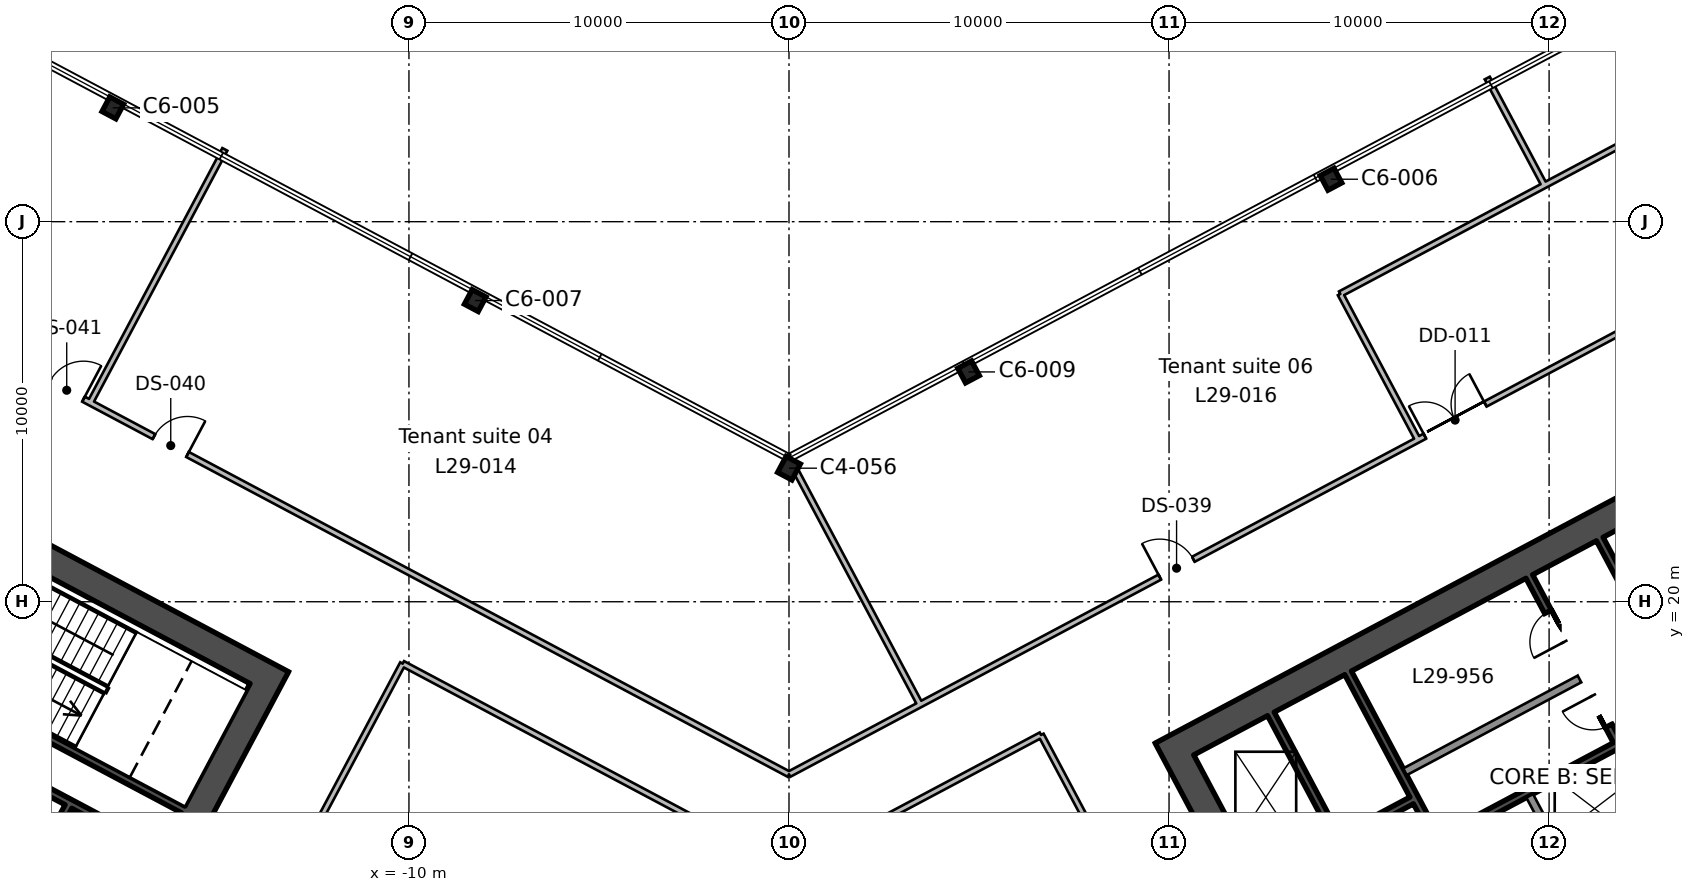
"""IFC4 building model, lengths in metres.
Left out: names, types, materials, properties, quantities, classifications, styles, units other than length and angle.
Written with IfcOpenShell. Run it as: python <this file> out.ifc"""

import sys

from ifc_helpers import new_model, si_unit, direction, frame, frame_2d, origin, origin_2d, place, context, subcontext, project, spatial, rectangle, i_section, extrude, element, fill, save


model = new_model("IFC4")
c1 = context("Model", 3, precision=1e-05, world=origin(), true_north=direction((0.0, 1.0)))
c2 = subcontext(c1, "Body", "Model", "MODEL_VIEW")
j1 = project(units=[si_unit("LENGTHUNIT", "METRE"), si_unit("PLANEANGLEUNIT", "RADIAN")], contexts=[c1])
p1 = place(None, origin())
s1 = spatial("IfcSite", under=j1, at=p1, CompositionType="ELEMENT")
p2 = place(p1, origin())
s2 = spatial("IfcBuilding", under=s1, at=p2, CompositionType="ELEMENT")
p3 = place(p2, frame((0.0, 0.0, 142.2)))
s3 = spatial("IfcBuildingStorey", under=s2, at=p3, CompositionType="ELEMENT", Elevation=142.2)
p4 = place(p3, frame((0.0, 23.514, 0.0), z_axis=(0.0, 0.0, 1.0), x_axis=(-0.882947592859, 0.469471562786, 0.0)))
e1 = element("IfcColumn", 1, at=p4, inside=s3, PredefinedType="COLUMN", context=c2, shape_type="SweptSolid", body=[
    extrude(i_section(OverallWidth=0.424, OverallDepth=0.475, WebThickness=0.048, FlangeThickness=0.077, FilletRadius=0.015, at=origin_2d()), origin(), (0.0, 0.0, 1.0), 4.0),
])
for number, where, z_axis, x_axis in (
    (2, (4.725, 26.047, 0.0), (0.0, 0.0, 1.0), (-0.883, -0.469, 0.0)),
    (3, (-8.257, 27.925, 0.0), (0.0, 0.0, 1.0), (-0.883, 0.469, 0.0)),
    (4, (14.261, 31.117, 0.0), (0.0, 0.0, 1.0), (-0.883, -0.469, 0.0)),
    (5, (-17.792, 32.995, 0.0), (0.0, 0.0, 1.0), (-0.883, 0.469, 0.0)),
):
    element("IfcColumn", number, at=place(p3, frame(where, z_axis=z_axis, x_axis=x_axis)), inside=s3, PredefinedType="COLUMN", context=c2, shape_type="SweptSolid", body=[
        extrude(i_section(OverallWidth=0.412, OverallDepth=0.434, WebThickness=0.036, FlangeThickness=0.057, FilletRadius=0.015, at=origin_2d()), origin(), (0.0, 0.0, 1.0), 4.0),
    ])
p5 = place(p3, frame((-13.498, 18.333, 0.0), z_axis=(0.0, 0.0, 1.0), x_axis=(-0.469469918705, -0.88294846703, 0.0)))
e6 = element("IfcWall", 6, at=p5, inside=s3, PredefinedType="SHEAR", context=c2, shape_type="SweptSolid", body=[
    extrude(rectangle(XDim=19.7, YDim=0.75, at=frame_2d((9.85, 0.0))), origin(), (0.0, 0.0, 1.0), 4.0),
])
p6 = place(p5, frame((6.85, 0.0, 0.0)))
e7 = element("IfcOpeningElement", 7, at=p6, cuts=e6, PredefinedType="OPENING", context=c2, shape_type="SweptSolid", body=[
    extrude(rectangle(XDim=2.4, YDim=2.4, at=frame_2d((1.2, 1.2))), frame((0.0, 0.385, 0.0), z_axis=(0.0, -1.0, 0.0), x_axis=(1.0, 0.0, 0.0)), (0.0, 0.0, 1.0), 0.77),
])
p7 = place(p3, frame((-14.005, 18.178, 0.0), z_axis=(0.0, 0.0, 1.0), x_axis=(-0.88295010195, 0.469466843842, 0.0)))
e8 = element("IfcWall", 8, at=p7, inside=s3, PredefinedType="SHEAR", context=c2, shape_type="SweptSolid", body=[
    extrude(rectangle(XDim=20.2, YDim=0.75, at=frame_2d((10.1, 0.0))), origin(), (0.0, 0.0, 1.0), 4.0),
])
p8 = place(p3, frame((-18.96, 14.611, 0.0), z_axis=(0.0, 0.0, 1.0), x_axis=(-0.4694473164, -0.882960484464, 0.0)))
e9 = element("IfcWall", 9, at=p8, inside=s3, PredefinedType="SHEAR", context=c2, shape_type="SweptSolid", body=[
    extrude(rectangle(XDim=2.2, YDim=0.2, at=frame_2d((1.1, 0.0))), origin(), (0.0, 0.0, 1.0), 4.0),
])
p9 = place(p3, frame((-15.942, 14.536, 0.0), z_axis=(0.0, 0.0, 1.0), x_axis=(-0.882946947542, 0.469472776449, 0.0)))
e10 = element("IfcWall", 10, at=p9, inside=s3, PredefinedType="SHEAR", context=c2, shape_type="SweptSolid", body=[
    extrude(rectangle(XDim=8.0, YDim=0.2, at=frame_2d((4.0, 0.0))), origin(), (0.0, 0.0, 1.0), 4.0),
])
p10 = place(p3, frame((-16.529, 13.432, 0.0), z_axis=(0.0, 0.0, 1.0), x_axis=(-0.88295287151, 0.469461634952, 0.0)))
e11 = element("IfcWall", 11, at=p10, inside=s3, PredefinedType="SHEAR", context=c2, shape_type="SweptSolid", body=[
    extrude(rectangle(XDim=8.0, YDim=0.2, at=frame_2d((4.0, 0.0))), origin(), (0.0, 0.0, 1.0), 4.0),
])
p11 = place(p3, frame((19.215, -0.939, 0.0), z_axis=(0.0, 0.0, 1.0), x_axis=(-0.469479580143, 0.882943329908, 0.0)))
e12 = element("IfcWall", 12, at=p11, inside=s3, PredefinedType="SHEAR", context=c2, shape_type="SweptSolid", body=[
    extrude(rectangle(XDim=19.7, YDim=0.75, at=frame_2d((9.85, 0.0))), origin(), (0.0, 0.0, 1.0), 4.0),
])
p12 = place(p11, frame((6.85, 0.0, 0.0)))
e13 = element("IfcOpeningElement", 13, at=p12, cuts=e12, PredefinedType="OPENING", context=c2, shape_type="SweptSolid", body=[
    extrude(rectangle(XDim=2.4, YDim=2.4, at=frame_2d((1.2, 1.2))), frame((0.0, 0.385, 0.0), z_axis=(0.0, -1.0, 0.0), x_axis=(1.0, 0.0, 0.0)), (0.0, 0.0, 1.0), 0.77),
])
p13 = place(p3, frame((10.474, 16.3, 0.0), z_axis=(0.0, 0.0, 1.0), x_axis=(0.88295010195, 0.469466843842, 0.0)))
e14 = element("IfcWall", 14, at=p13, inside=s3, PredefinedType="SHEAR", context=c2, shape_type="SweptSolid", body=[
    extrude(rectangle(XDim=20.2, YDim=0.75, at=frame_2d((10.1, 0.0))), origin(), (0.0, 0.0, 1.0), 4.0),
])
p14 = place(p3, frame((14.394, 13.826, 0.0), z_axis=(0.0, 0.0, 1.0), x_axis=(-0.469494272526, 0.882935517501, 0.0)))
e15 = element("IfcWall", 15, at=p14, inside=s3, PredefinedType="SHEAR", context=c2, shape_type="SweptSolid", body=[
    extrude(rectangle(XDim=3.65, YDim=0.2, at=frame_2d((1.825, 0.0))), origin(), (0.0, 0.0, 1.0), 4.0),
])
p15 = place(p3, frame((18.138, 11.683, 0.0), z_axis=(0.0, 0.0, 1.0), x_axis=(-0.469480409012, 0.88294288918, 0.0)))
e16 = element("IfcWall", 16, at=p15, inside=s3, PredefinedType="SHEAR", context=c2, shape_type="SweptSolid", body=[
    extrude(rectangle(XDim=7.3, YDim=0.2, at=frame_2d((3.65, 0.0))), origin(), (0.0, 0.0, 1.0), 4.0),
])
p16 = place(p3, frame((20.522, 12.95, 0.0), z_axis=(0.0, 0.0, 1.0), x_axis=(-0.469401318492, 0.882984938828, 0.0)))
e17 = element("IfcWall", 17, at=p16, inside=s3, PredefinedType="SOLIDWALL", context=c2, shape_type="SweptSolid", body=[
    extrude(rectangle(XDim=2.2, YDim=0.2, at=frame_2d((1.1, 0.0))), origin(), (0.0, 0.0, 1.0), 4.0),
])
p17 = place(p3, frame((22.906, 14.218, 0.0), z_axis=(0.0, 0.0, 1.0), x_axis=(-0.469480409012, 0.88294288918, 0.0)))
e18 = element("IfcWall", 18, at=p17, inside=s3, PredefinedType="SHEAR", context=c2, shape_type="SweptSolid", body=[
    extrude(rectangle(XDim=7.3, YDim=0.2, at=frame_2d((3.65, 0.0))), origin(), (0.0, 0.0, 1.0), 4.0),
])
p18 = place(p17, frame((2.85, 0.0, 0.0)))
e19 = element("IfcOpeningElement", 19, at=p18, cuts=e18, PredefinedType="OPENING", context=c2, shape_type="SweptSolid", body=[
    extrude(rectangle(XDim=0.9, YDim=2.1, at=frame_2d((0.45, 1.05))), frame((0.0, 0.11, 0.0), z_axis=(0.0, -1.0, 0.0), x_axis=(1.0, 0.0, 0.0)), (0.0, 0.0, 1.0), 0.22),
])
p19 = place(p17, frame((5.35, 0.0, 0.0)))
e20 = element("IfcOpeningElement", 20, at=p19, cuts=e18, PredefinedType="OPENING", context=c2, shape_type="SweptSolid", body=[
    extrude(rectangle(XDim=0.9, YDim=2.1, at=frame_2d((0.45, 1.05))), frame((0.0, 0.11, 0.0), z_axis=(0.0, -1.0, 0.0), x_axis=(1.0, 0.0, 0.0)), (0.0, 0.0, 1.0), 0.22),
])
p20 = place(p3, frame((24.76, 15.204, 0.0), z_axis=(0.0, 0.0, 1.0), x_axis=(-0.469494272526, 0.882935517501, 0.0)))
e21 = element("IfcWall", 21, at=p20, inside=s3, PredefinedType="SHEAR", context=c2, shape_type="SweptSolid", body=[
    extrude(rectangle(XDim=7.3, YDim=0.2, at=frame_2d((3.65, 0.0))), origin(), (0.0, 0.0, 1.0), 4.0),
])
p21 = place(p20, frame((4.8, 0.0, 0.0)))
e22 = element("IfcOpeningElement", 22, at=p21, cuts=e21, PredefinedType="OPENING", context=c2, shape_type="SweptSolid", body=[
    extrude(rectangle(XDim=1.2, YDim=2.1, at=frame_2d((0.6, 1.05))), frame((0.0, 0.11, 0.0), z_axis=(0.0, -1.0, 0.0), x_axis=(1.0, 0.0, 0.0)), (0.0, 0.0, 1.0), 0.22),
])
p22 = place(p3, frame((17.147, 13.761, 0.0), z_axis=(0.0, 0.0, 1.0), x_axis=(0.882964314875, 0.469440111896, 0.0)))
e23 = element("IfcWall", 23, at=p22, inside=s3, PredefinedType="SHEAR", context=c2, shape_type="SweptSolid", body=[
    extrude(rectangle(XDim=5.2, YDim=0.2, at=frame_2d((2.6, 0.0))), origin(), (0.0, 0.0, 1.0), 4.0),
])
p23 = place(p3, frame((12.41, 12.658, 0.0), z_axis=(0.0, 0.0, 1.0), x_axis=(0.8829484765, 0.469469900894, 0.0)))
e24 = element("IfcWall", 24, at=p23, inside=s3, PredefinedType="SHEAR", context=c2, shape_type="SweptSolid", body=[
    extrude(rectangle(XDim=4.5, YDim=0.2, at=frame_2d((2.25, 0.0))), origin(), (0.0, 0.0, 1.0), 4.0),
])
p24 = place(p23, frame((0.6, 0.0, 0.0)))
e25 = element("IfcOpeningElement", 25, at=p24, cuts=e24, PredefinedType="OPENING", context=c2, shape_type="SweptSolid", body=[
    extrude(rectangle(XDim=1.1, YDim=2.1, at=frame_2d((0.55, 1.05))), frame((0.0, 0.11, 0.0), z_axis=(0.0, -1.0, 0.0), x_axis=(1.0, 0.0, 0.0)), (0.0, 0.0, 1.0), 0.22),
])
p25 = place(p3, frame((16.208, 15.527, 0.0), z_axis=(0.0, 0.0, 1.0), x_axis=(0.882953967957, 0.469459572775, 0.0)))
e26 = element("IfcWall", 26, at=p25, inside=s3, PredefinedType="SOLIDWALL", context=c2, shape_type="SweptSolid", body=[
    extrude(rectangle(XDim=5.2, YDim=0.2, at=frame_2d((2.6, 0.0))), origin(), (0.0, 0.0, 1.0), 4.0),
])
p26 = place(p3, frame((-32.47, 32.724, 0.0), z_axis=(0.0, 0.0, 1.0), x_axis=(0.88295243426, -0.469462457321, 0.0)))
e27 = element("IfcWall", 27, at=p26, inside=s3, PredefinedType="PARTITIONING", context=c2, shape_type="SweptSolid", body=[
    extrude(rectangle(XDim=36.774, YDim=0.15, at=frame_2d((18.387, 0.0))), origin(), (0.0, 0.0, 1.0), 3.64),
])
p27 = place(p26, frame((17.85, 0.0, 0.0)))
e28 = element("IfcOpeningElement", 28, at=p27, cuts=e27, PredefinedType="OPENING", context=c2, shape_type="SweptSolid", body=[
    extrude(rectangle(XDim=1.0, YDim=2.1, at=frame_2d((0.5, 1.05))), frame((0.0, 0.085, 0.0), z_axis=(0.0, -1.0, 0.0), x_axis=(1.0, 0.0, 0.0)), (0.0, 0.0, 1.0), 0.17),
])
p28 = place(p26, frame((14.75, 0.0, 0.0)))
e29 = element("IfcOpeningElement", 29, at=p28, cuts=e27, PredefinedType="OPENING", context=c2, shape_type="SweptSolid", body=[
    extrude(rectangle(XDim=1.0, YDim=2.1, at=frame_2d((0.5, 1.05))), frame((0.0, 0.085, 0.0), z_axis=(0.0, -1.0, 0.0), x_axis=(1.0, 0.0, 0.0)), (0.0, 0.0, 1.0), 0.17),
])
p29 = place(p3, frame((0.0, 15.46, 0.0), z_axis=(0.0, 0.0, 1.0), x_axis=(0.882944798935, 0.469476817355, 0.0)))
e30 = element("IfcWall", 30, at=p29, inside=s3, PredefinedType="PARTITIONING", context=c2, shape_type="SweptSolid", body=[
    extrude(rectangle(XDim=23.107, YDim=0.15, at=frame_2d((11.553, 0.0))), origin(), (0.0, 0.0, 1.0), 3.64),
])
p30 = place(p29, frame((18.95, 0.0, 0.0)))
e31 = element("IfcOpeningElement", 31, at=p30, cuts=e30, PredefinedType="OPENING", context=c2, shape_type="SweptSolid", body=[
    extrude(rectangle(XDim=1.8, YDim=2.1, at=frame_2d((0.9, 1.05))), frame((0.0, 0.085, 0.0), z_axis=(0.0, -1.0, 0.0), x_axis=(1.0, 0.0, 0.0)), (0.0, 0.0, 1.0), 0.17),
])
p31 = place(p29, frame((11.05, 0.0, 0.0)))
e32 = element("IfcOpeningElement", 32, at=p31, cuts=e30, PredefinedType="OPENING", context=c2, shape_type="SweptSolid", body=[
    extrude(rectangle(XDim=1.0, YDim=2.1, at=frame_2d((0.5, 1.05))), frame((0.0, 0.085, 0.0), z_axis=(0.0, -1.0, 0.0), x_axis=(1.0, 0.0, 0.0)), (0.0, 0.0, 1.0), 0.17),
])
p32 = place(p3, frame((-14.844, 31.903, 0.0), z_axis=(0.0, 0.0, 1.0), x_axis=(-0.469271860983, -0.883053747226, 0.0)))
e33 = element("IfcWall", 33, at=p32, inside=s3, PredefinedType="PARTITIONING", context=c2, shape_type="SweptSolid", body=[
    extrude(rectangle(XDim=7.55, YDim=0.15, at=frame_2d((3.775, 0.0))), origin(), (0.0, 0.0, 1.0), 3.64),
])
p33 = place(p3, frame((0.191, 23.422, 0.0), z_axis=(0.0, 0.0, 1.0), x_axis=(0.46954180368, -0.882910241529, 0.0)))
e34 = element("IfcWall", 34, at=p33, inside=s3, PredefinedType="PARTITIONING", context=c2, shape_type="SweptSolid", body=[
    extrude(rectangle(XDim=6.941, YDim=0.15, at=frame_2d((3.47, 0.0))), origin(), (0.0, 0.0, 1.0), 3.64),
])
p34 = place(p3, frame((14.507, 28.1, 0.0), z_axis=(0.0, 0.0, 1.0), x_axis=(0.469255579647, -0.883062399251, 0.0)))
e35 = element("IfcWall", 35, at=p34, inside=s3, PredefinedType="PARTITIONING", context=c2, shape_type="SweptSolid", body=[
    extrude(rectangle(XDim=4.328, YDim=0.15, at=frame_2d((2.164, 0.0))), origin(), (0.0, 0.0, 1.0), 3.64),
])
p35 = place(p3, frame((14.506, 28.099, 0.0), z_axis=(0.0, 0.0, 1.0), x_axis=(0.882949189538, 0.469468559857, 0.0)))
e36 = element("IfcWall", 36, at=p35, inside=s3, PredefinedType="PARTITIONING", context=c2, shape_type="SweptSolid", body=[
    extrude(rectangle(XDim=6.0, YDim=0.15, at=frame_2d((3.0, 0.0))), origin(), (0.0, 0.0, 1.0), 3.64),
])
p36 = place(p3, frame((18.374, 33.78, 0.0), z_axis=(0.0, 0.0, 1.0), x_axis=(0.469685095616, -0.882834022315, 0.0)))
e37 = element("IfcWall", 37, at=p36, inside=s3, PredefinedType="PARTITIONING", context=c2, shape_type="SweptSolid", body=[
    extrude(rectangle(XDim=3.2, YDim=0.15, at=frame_2d((1.6, 0.0))), origin(), (0.0, 0.0, 1.0), 3.64),
])
p37 = place(p3, frame((19.804, 30.916, 0.0), z_axis=(0.0, 0.0, 1.0), x_axis=(0.882942088651, 0.469481914548, 0.0)))
e38 = element("IfcWall", 38, at=p37, inside=s3, PredefinedType="PARTITIONING", context=c2, shape_type="SweptSolid", body=[
    extrude(rectangle(XDim=23.511, YDim=0.15, at=frame_2d((11.756, 0.0))), origin(), (0.0, 0.0, 1.0), 3.64),
])
p38 = place(p3, frame((20.402, 26.308, 0.0), z_axis=(0.0, 0.0, 1.0), x_axis=(0.882958355843, 0.469451319997, 0.0)))
e39 = element("IfcWall", 39, at=p38, inside=s3, PredefinedType="PARTITIONING", context=c2, shape_type="SweptSolid", body=[
    extrude(rectangle(XDim=18.285, YDim=0.15, at=frame_2d((9.143, 0.0))), origin(), (0.0, 0.0, 1.0), 3.64),
])
p39 = place(p3, frame((-20.915, -1.847, 0.0), z_axis=(0.0, 0.0, 1.0), x_axis=(0.469483365134, 0.882941317338, 0.0)))
e40 = element("IfcWall", 40, at=p39, inside=s3, PredefinedType="PARTITIONING", context=c2, shape_type="SweptSolid", body=[
    extrude(rectangle(XDim=22.9, YDim=0.15, at=frame_2d((11.45, 0.0))), origin(), (0.0, 0.0, 1.0), 3.64),
])
p40 = place(p39, frame((10.95, 0.0, 0.0)))
e41 = element("IfcOpeningElement", 41, at=p40, cuts=e40, PredefinedType="OPENING", context=c2, shape_type="SweptSolid", body=[
    extrude(rectangle(XDim=1.0, YDim=2.1, at=frame_2d((0.5, 1.05))), frame((0.0, 0.085, 0.0), z_axis=(0.0, -1.0, 0.0), x_axis=(1.0, 0.0, 0.0)), (0.0, 0.0, 1.0), 0.17),
])
p41 = place(p3, frame((-10.164, 18.372, 0.0), z_axis=(0.0, 0.0, 1.0), x_axis=(0.882954583112, -0.469458415796, 0.0)))
e42 = element("IfcWall", 42, at=p41, inside=s3, PredefinedType="PARTITIONING", context=c2, shape_type="SweptSolid", body=[
    extrude(rectangle(XDim=10.165, YDim=0.15, at=frame_2d((5.083, 0.0))), origin(), (0.0, 0.0, 1.0), 3.64),
])
p42 = place(p3, frame((8.172, 13.6, 0.0), z_axis=(0.0, 0.0, 1.0), x_axis=(-0.4694129048, 0.882978779364, 0.0)))
e43 = element("IfcWall", 43, at=p42, inside=s3, PredefinedType="PARTITIONING", context=c2, shape_type="SweptSolid", body=[
    extrude(rectangle(XDim=3.279, YDim=0.15, at=frame_2d((1.639, 0.0))), origin(), (0.0, 0.0, 1.0), 3.64),
])
p43 = place(p3, frame((6.633, 16.495, 0.0), z_axis=(0.0, 0.0, 1.0), x_axis=(-0.882924427048, -0.469515128747, 0.0)))
e44 = element("IfcWall", 44, at=p43, inside=s3, PredefinedType="PARTITIONING", context=c2, shape_type="SweptSolid", body=[
    extrude(rectangle(XDim=6.166, YDim=0.15, at=frame_2d((3.083, 0.0))), origin(), (0.0, 0.0, 1.0), 3.64),
])
p44 = place(p18, origin())
e45 = element("IfcDoor", 45, at=p44, inside=s3, OperationType="SINGLE_SWING_RIGHT", PredefinedType="DOOR", context=c2, shape_type="SweptSolid", body=[
    extrude(rectangle(XDim=0.9, YDim=2.1, at=frame_2d((0.45, 1.05))), frame((0.0, 0.025, 0.0), z_axis=(0.0, -1.0, 0.0), x_axis=(1.0, 0.0, 0.0)), (0.0, 0.0, 1.0), 0.05),
])
fill(e19, e45)
p45 = place(p19, origin())
e46 = element("IfcDoor", 46, at=p45, inside=s3, OperationType="SINGLE_SWING_LEFT", PredefinedType="DOOR", context=c2, shape_type="SweptSolid", body=[
    extrude(rectangle(XDim=0.9, YDim=2.1, at=frame_2d((0.45, 1.05))), frame((0.0, 0.025, 0.0), z_axis=(0.0, -1.0, 0.0), x_axis=(1.0, 0.0, 0.0)), (0.0, 0.0, 1.0), 0.05),
])
fill(e20, e46)
p46 = place(p30, origin())
e47 = element("IfcDoor", 47, at=p46, inside=s3, OperationType="DOUBLE_DOOR_SINGLE_SWING", PredefinedType="DOOR", context=c2, shape_type="SweptSolid", body=[
    extrude(rectangle(XDim=1.8, YDim=2.1, at=frame_2d((0.9, 1.05))), frame((0.0, 0.025, 0.0), z_axis=(0.0, -1.0, 0.0), x_axis=(1.0, 0.0, 0.0)), (0.0, 0.0, 1.0), 0.05),
])
fill(e31, e47)
p47 = place(p31, origin())
e48 = element("IfcDoor", 48, at=p47, inside=s3, OperationType="SINGLE_SWING_LEFT", PredefinedType="DOOR", context=c2, shape_type="SweptSolid", body=[
    extrude(rectangle(XDim=1.0, YDim=2.1, at=frame_2d((0.5, 1.05))), frame((0.0, 0.025, 0.0), z_axis=(0.0, -1.0, 0.0), x_axis=(1.0, 0.0, 0.0)), (0.0, 0.0, 1.0), 0.05),
])
fill(e32, e48)
p48 = place(p27, origin())
e49 = element("IfcDoor", 49, at=p48, inside=s3, OperationType="SINGLE_SWING_RIGHT", PredefinedType="DOOR", context=c2, shape_type="SweptSolid", body=[
    extrude(rectangle(XDim=1.0, YDim=2.1, at=frame_2d((0.5, 1.05))), frame((0.0, 0.025, 0.0), z_axis=(0.0, -1.0, 0.0), x_axis=(1.0, 0.0, 0.0)), (0.0, 0.0, 1.0), 0.05),
])
fill(e28, e49)
p49 = place(p28, origin())
e50 = element("IfcDoor", 50, at=p49, inside=s3, OperationType="SINGLE_SWING_RIGHT", PredefinedType="DOOR", context=c2, shape_type="SweptSolid", body=[
    extrude(rectangle(XDim=1.0, YDim=2.1, at=frame_2d((0.5, 1.05))), frame((0.0, 0.025, 0.0), z_axis=(0.0, -1.0, 0.0), x_axis=(1.0, 0.0, 0.0)), (0.0, 0.0, 1.0), 0.05),
])
fill(e29, e50)
save(model, sys.argv[1])
